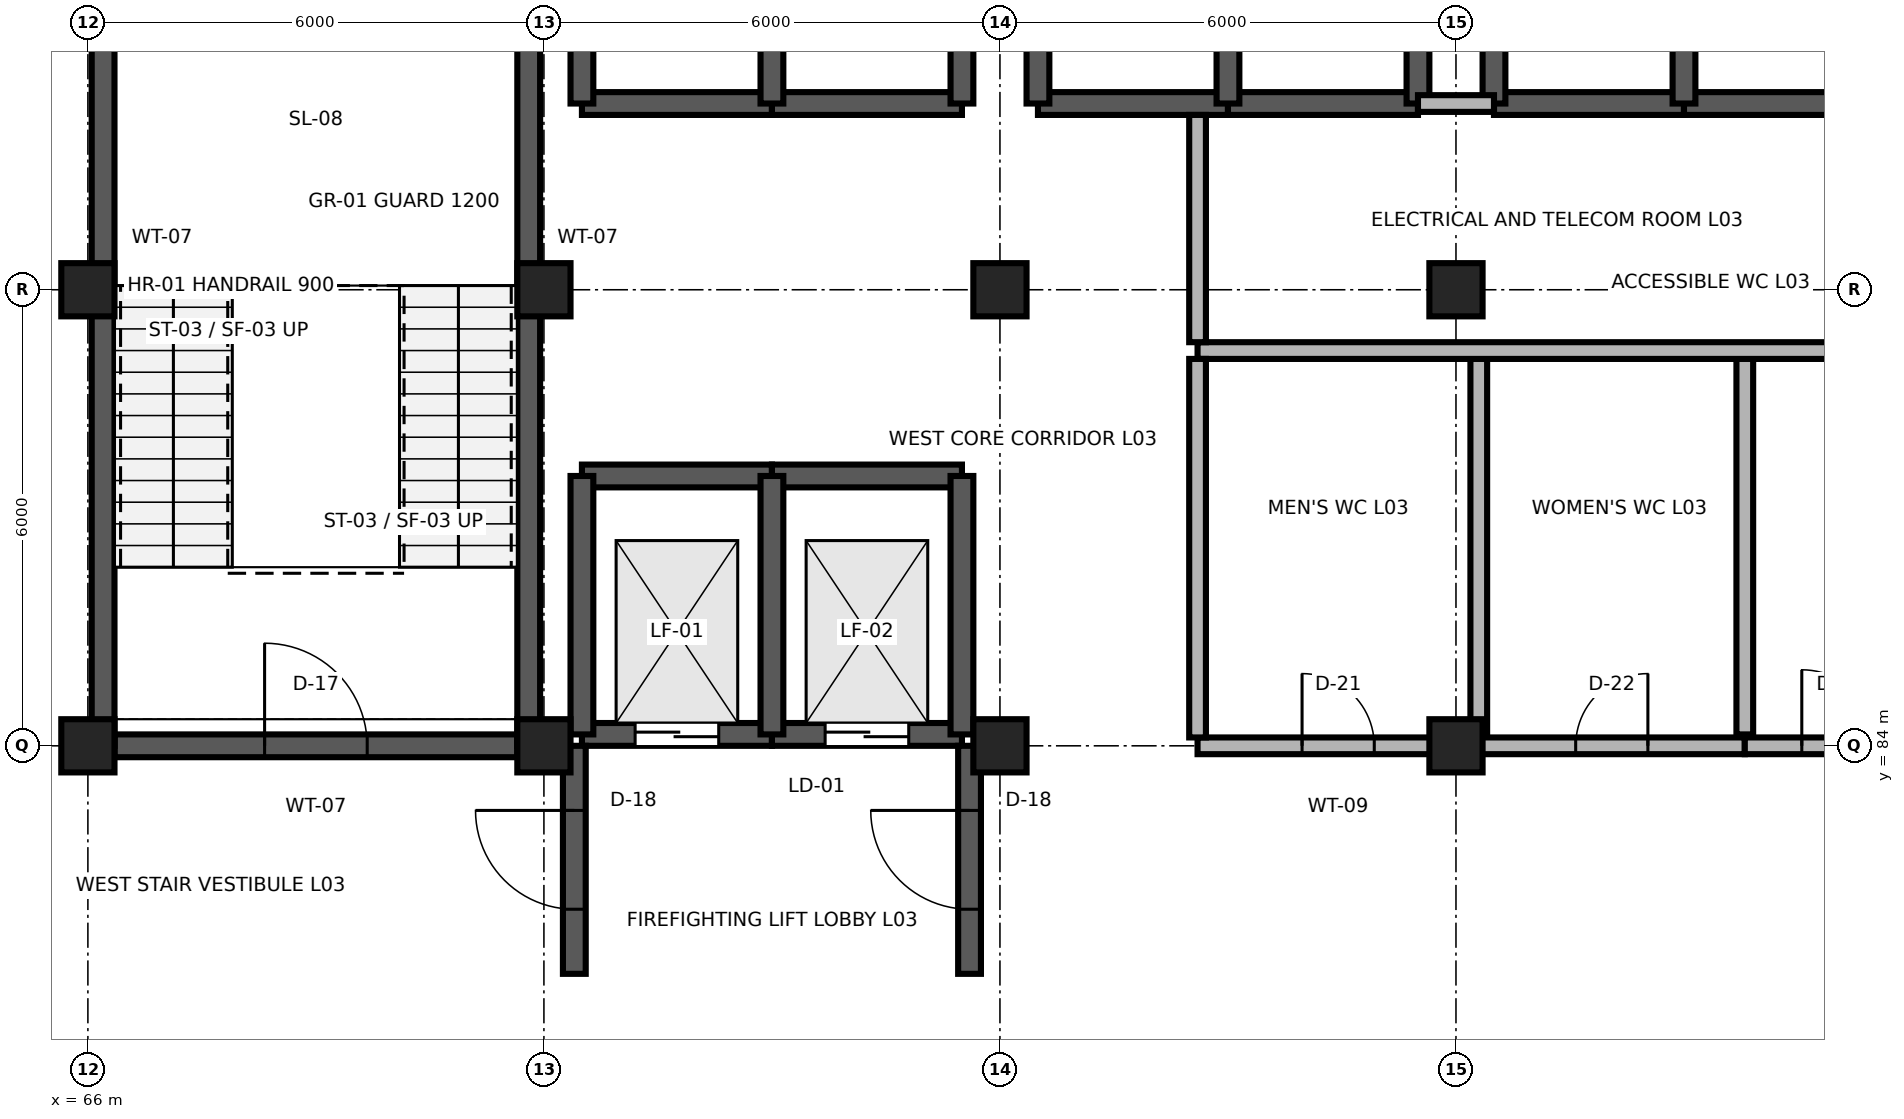
"""IFC4 building model, lengths in metres.
Left out: names, types, materials, properties, quantities, classifications, styles, units other than length and angle.
Written with IfcOpenShell. Run it as: python <this file> out.ifc"""

import sys

from ifc_helpers import new_model, si_unit, direction, frame, frame_2d, origin, origin_2d, place, context, subcontext, project, spatial, rectangle, extrude, element, fill, save


model = new_model("IFC4")
c1 = context("Model", 3, precision=1e-05, world=origin(), true_north=direction((0.0, 1.0)))
c2 = subcontext(c1, "Body", "Model", "MODEL_VIEW")
j1 = project(units=[si_unit("LENGTHUNIT", "METRE"), si_unit("PLANEANGLEUNIT", "RADIAN")], contexts=[c1])
p1 = place(None, origin())
s1 = spatial("IfcSite", under=j1, at=p1, CompositionType="ELEMENT")
p2 = place(p1, origin())
s2 = spatial("IfcBuilding", under=s1, at=p2, CompositionType="ELEMENT")
p3 = place(p2, frame((0.0, 0.0, 12.0)))
s3 = spatial("IfcBuildingStorey", under=s2, at=p3, CompositionType="ELEMENT", Elevation=12.0)
for number, where, z_axis, x_axis in (
    (1, (66.0, 84.0, 0.0), (0.0, 0.0, 1.0), (1.0, 0.0, 0.0)),
    (2, (72.0, 84.0, 0.0), (0.0, 0.0, 1.0), (1.0, 0.0, 0.0)),
    (3, (78.0, 84.0, 0.0), (0.0, 0.0, 1.0), (1.0, 0.0, 0.0)),
    (4, (84.0, 84.0, 0.0), (0.0, 0.0, 1.0), (1.0, 0.0, 0.0)),
    (5, (66.0, 90.0, 0.0), (0.0, 0.0, 1.0), (1.0, 0.0, 0.0)),
    (6, (72.0, 90.0, 0.0), (0.0, 0.0, 1.0), (1.0, 0.0, 0.0)),
    (7, (78.0, 90.0, 0.0), (0.0, 0.0, 1.0), (1.0, 0.0, 0.0)),
    (8, (84.0, 90.0, 0.0), (0.0, 0.0, 1.0), (1.0, 0.0, 0.0)),
):
    element("IfcColumn", number, at=place(p3, frame(where, z_axis=z_axis, x_axis=x_axis)), inside=s3, PredefinedType="COLUMN", context=c2, shape_type="SweptSolid", body=[
        extrude(rectangle(XDim=0.7, YDim=0.7, at=origin_2d()), origin(), (0.0, 0.0, 1.0), 4.5),
    ])
p4 = place(p3, frame((66.35, 84.0, 0.0), z_axis=(0.0, 0.0, 1.0), x_axis=(1.0, 0.0, 0.0)))
e9 = element("IfcWall", 9, at=p4, inside=s3, PredefinedType="SHEAR", context=c2, shape_type="SweptSolid", body=[
    extrude(rectangle(XDim=5.3, YDim=0.3, at=frame_2d((2.65, 0.0))), origin(), (0.0, 0.0, 1.0), 4.22),
])
p5 = place(p4, frame((1.975, 0.0, 0.0)))
e10 = element("IfcOpeningElement", 10, at=p5, cuts=e9, PredefinedType="OPENING", context=c2, shape_type="SweptSolid", body=[
    extrude(rectangle(XDim=1.35, YDim=2.2, at=frame_2d((0.675, 1.1))), frame((0.0, 0.165, 0.0), z_axis=(0.0, -1.0, 0.0), x_axis=(1.0, 0.0, 0.0)), (0.0, 0.0, 1.0), 0.33),
])
for number, where, z_axis, x_axis in (
    (11, (66.2, 84.0, 0.0), (0.0, 0.0, 1.0), (0.0, 1.0, 0.0)),
    (12, (71.8, 84.0, 0.0), (0.0, 0.0, 1.0), (0.0, 1.0, 0.0)),
):
    element("IfcWall", number, at=place(p3, frame(where, z_axis=z_axis, x_axis=x_axis)), inside=s3, PredefinedType="SHEAR", context=c2, shape_type="SweptSolid", body=[
        extrude(rectangle(XDim=11.8, YDim=0.3, at=frame_2d((5.9, 0.0))), origin(), (0.0, 0.0, 1.0), 4.22),
    ])
p6 = place(p3, frame((72.5, 84.15, 0.0), z_axis=(0.0, 0.0, 1.0), x_axis=(1.0, 0.0, 0.0)))
e13 = element("IfcWall", 13, at=p6, inside=s3, PredefinedType="SHEAR", context=c2, shape_type="SweptSolid", body=[
    extrude(rectangle(XDim=2.5, YDim=0.3, at=frame_2d((1.25, 0.0))), origin(), (0.0, 0.0, 1.0), 4.22),
])
p7 = place(p6, frame((0.7, 0.0, 0.0)))
e14 = element("IfcOpeningElement", 14, at=p7, cuts=e13, PredefinedType="OPENING", context=c2, shape_type="SweptSolid", body=[
    extrude(rectangle(XDim=1.1, YDim=2.1, at=frame_2d((0.55, 1.05))), frame((0.0, 0.165, 0.0), z_axis=(0.0, -1.0, 0.0), x_axis=(1.0, 0.0, 0.0)), (0.0, 0.0, 1.0), 0.33),
])
p8 = place(p3, frame((72.5, 87.55, 0.0), z_axis=(0.0, 0.0, 1.0), x_axis=(1.0, 0.0, 0.0)))
e15 = element("IfcWall", 15, at=p8, inside=s3, PredefinedType="SHEAR", context=c2, shape_type="SweptSolid", body=[
    extrude(rectangle(XDim=2.5, YDim=0.3, at=frame_2d((1.25, 0.0))), origin(), (0.0, 0.0, 1.0), 4.22),
])
p9 = place(p3, frame((72.5, 84.15, 0.0), z_axis=(0.0, 0.0, 1.0), x_axis=(0.0, 1.0, 0.0)))
e16 = element("IfcWall", 16, at=p9, inside=s3, PredefinedType="SHEAR", context=c2, shape_type="SweptSolid", body=[
    extrude(rectangle(XDim=3.4, YDim=0.3, at=frame_2d((1.7, 0.0))), origin(), (0.0, 0.0, 1.0), 4.22),
])
p10 = place(p3, frame((75.0, 84.15, 0.0), z_axis=(0.0, 0.0, 1.0), x_axis=(1.0, 0.0, 0.0)))
e17 = element("IfcWall", 17, at=p10, inside=s3, PredefinedType="SHEAR", context=c2, shape_type="SweptSolid", body=[
    extrude(rectangle(XDim=2.5, YDim=0.3, at=frame_2d((1.25, 0.0))), origin(), (0.0, 0.0, 1.0), 4.22),
])
p11 = place(p10, frame((0.7, 0.0, 0.0)))
e18 = element("IfcOpeningElement", 18, at=p11, cuts=e17, PredefinedType="OPENING", context=c2, shape_type="SweptSolid", body=[
    extrude(rectangle(XDim=1.1, YDim=2.1, at=frame_2d((0.55, 1.05))), frame((0.0, 0.165, 0.0), z_axis=(0.0, -1.0, 0.0), x_axis=(1.0, 0.0, 0.0)), (0.0, 0.0, 1.0), 0.33),
])
p12 = place(p3, frame((75.0, 87.55, 0.0), z_axis=(0.0, 0.0, 1.0), x_axis=(1.0, 0.0, 0.0)))
e19 = element("IfcWall", 19, at=p12, inside=s3, PredefinedType="SHEAR", context=c2, shape_type="SweptSolid", body=[
    extrude(rectangle(XDim=2.5, YDim=0.3, at=frame_2d((1.25, 0.0))), origin(), (0.0, 0.0, 1.0), 4.22),
])
for number, where, z_axis, x_axis in (
    (20, (75.0, 84.15, 0.0), (0.0, 0.0, 1.0), (0.0, 1.0, 0.0)),
    (21, (77.5, 84.15, 0.0), (0.0, 0.0, 1.0), (0.0, 1.0, 0.0)),
):
    element("IfcWall", number, at=place(p3, frame(where, z_axis=z_axis, x_axis=x_axis)), inside=s3, PredefinedType="SHEAR", context=c2, shape_type="SweptSolid", body=[
        extrude(rectangle(XDim=3.4, YDim=0.3, at=frame_2d((1.7, 0.0))), origin(), (0.0, 0.0, 1.0), 4.22),
    ])
p13 = place(p3, frame((72.5, 92.45, 0.0), z_axis=(0.0, 0.0, 1.0), x_axis=(1.0, 0.0, 0.0)))
e22 = element("IfcWall", 22, at=p13, inside=s3, PredefinedType="SHEAR", context=c2, shape_type="SweptSolid", body=[
    extrude(rectangle(XDim=2.5, YDim=0.3, at=frame_2d((1.25, 0.0))), origin(), (0.0, 0.0, 1.0), 4.22),
])
p14 = place(p3, frame((72.5, 92.45, 0.0), z_axis=(0.0, 0.0, 1.0), x_axis=(0.0, 1.0, 0.0)))
e23 = element("IfcWall", 23, at=p14, inside=s3, PredefinedType="SHEAR", context=c2, shape_type="SweptSolid", body=[
    extrude(rectangle(XDim=3.4, YDim=0.3, at=frame_2d((1.7, 0.0))), origin(), (0.0, 0.0, 1.0), 4.22),
])
p15 = place(p3, frame((75.0, 92.45, 0.0), z_axis=(0.0, 0.0, 1.0), x_axis=(1.0, 0.0, 0.0)))
e24 = element("IfcWall", 24, at=p15, inside=s3, PredefinedType="SHEAR", context=c2, shape_type="SweptSolid", body=[
    extrude(rectangle(XDim=2.5, YDim=0.3, at=frame_2d((1.25, 0.0))), origin(), (0.0, 0.0, 1.0), 4.22),
])
for number, where, z_axis, x_axis in (
    (25, (75.0, 92.45, 0.0), (0.0, 0.0, 1.0), (0.0, 1.0, 0.0)),
    (26, (77.5, 92.45, 0.0), (0.0, 0.0, 1.0), (0.0, 1.0, 0.0)),
):
    element("IfcWall", number, at=place(p3, frame(where, z_axis=z_axis, x_axis=x_axis)), inside=s3, PredefinedType="SHEAR", context=c2, shape_type="SweptSolid", body=[
        extrude(rectangle(XDim=3.4, YDim=0.3, at=frame_2d((1.7, 0.0))), origin(), (0.0, 0.0, 1.0), 4.22),
    ])
p16 = place(p3, frame((78.5, 92.45, 0.0), z_axis=(0.0, 0.0, 1.0), x_axis=(1.0, 0.0, 0.0)))
e27 = element("IfcWall", 27, at=p16, inside=s3, PredefinedType="SHEAR", context=c2, shape_type="SweptSolid", body=[
    extrude(rectangle(XDim=2.5, YDim=0.3, at=frame_2d((1.25, 0.0))), origin(), (0.0, 0.0, 1.0), 4.22),
])
p17 = place(p3, frame((78.5, 92.45, 0.0), z_axis=(0.0, 0.0, 1.0), x_axis=(0.0, 1.0, 0.0)))
e28 = element("IfcWall", 28, at=p17, inside=s3, PredefinedType="SHEAR", context=c2, shape_type="SweptSolid", body=[
    extrude(rectangle(XDim=3.4, YDim=0.3, at=frame_2d((1.7, 0.0))), origin(), (0.0, 0.0, 1.0), 4.22),
])
p18 = place(p3, frame((81.0, 92.45, 0.0), z_axis=(0.0, 0.0, 1.0), x_axis=(1.0, 0.0, 0.0)))
e29 = element("IfcWall", 29, at=p18, inside=s3, PredefinedType="SHEAR", context=c2, shape_type="SweptSolid", body=[
    extrude(rectangle(XDim=2.5, YDim=0.3, at=frame_2d((1.25, 0.0))), origin(), (0.0, 0.0, 1.0), 4.22),
])
for number, where, z_axis, x_axis in (
    (30, (81.0, 92.45, 0.0), (0.0, 0.0, 1.0), (0.0, 1.0, 0.0)),
    (31, (83.5, 92.45, 0.0), (0.0, 0.0, 1.0), (0.0, 1.0, 0.0)),
):
    element("IfcWall", number, at=place(p3, frame(where, z_axis=z_axis, x_axis=x_axis)), inside=s3, PredefinedType="SHEAR", context=c2, shape_type="SweptSolid", body=[
        extrude(rectangle(XDim=3.4, YDim=0.3, at=frame_2d((1.7, 0.0))), origin(), (0.0, 0.0, 1.0), 4.22),
    ])
p19 = place(p3, frame((84.5, 92.45, 0.0), z_axis=(0.0, 0.0, 1.0), x_axis=(1.0, 0.0, 0.0)))
e32 = element("IfcWall", 32, at=p19, inside=s3, PredefinedType="SHEAR", context=c2, shape_type="SweptSolid", body=[
    extrude(rectangle(XDim=2.5, YDim=0.3, at=frame_2d((1.25, 0.0))), origin(), (0.0, 0.0, 1.0), 4.22),
])
p20 = place(p3, frame((84.5, 92.45, 0.0), z_axis=(0.0, 0.0, 1.0), x_axis=(0.0, 1.0, 0.0)))
e33 = element("IfcWall", 33, at=p20, inside=s3, PredefinedType="SHEAR", context=c2, shape_type="SweptSolid", body=[
    extrude(rectangle(XDim=3.4, YDim=0.3, at=frame_2d((1.7, 0.0))), origin(), (0.0, 0.0, 1.0), 4.22),
])
p21 = place(p3, frame((87.0, 92.45, 0.0), z_axis=(0.0, 0.0, 1.0), x_axis=(1.0, 0.0, 0.0)))
e34 = element("IfcWall", 34, at=p21, inside=s3, PredefinedType="SHEAR", context=c2, shape_type="SweptSolid", body=[
    extrude(rectangle(XDim=2.5, YDim=0.3, at=frame_2d((1.25, 0.0))), origin(), (0.0, 0.0, 1.0), 4.22),
])
p22 = place(p3, frame((87.0, 92.45, 0.0), z_axis=(0.0, 0.0, 1.0), x_axis=(0.0, 1.0, 0.0)))
e35 = element("IfcWall", 35, at=p22, inside=s3, PredefinedType="SHEAR", context=c2, shape_type="SweptSolid", body=[
    extrude(rectangle(XDim=3.4, YDim=0.3, at=frame_2d((1.7, 0.0))), origin(), (0.0, 0.0, 1.0), 4.22),
])
p23 = place(p3, frame((72.4, 81.0, 0.0), z_axis=(0.0, 0.0, 1.0), x_axis=(0.0, 1.0, 0.0)))
e36 = element("IfcWall", 36, at=p23, inside=s3, PredefinedType="SHEAR", context=c2, shape_type="SweptSolid", body=[
    extrude(rectangle(XDim=3.0, YDim=0.3, at=frame_2d((1.5, 0.0))), origin(), (0.0, 0.0, 1.0), 4.22),
])
p24 = place(p23, frame((0.85, 0.0, 0.0)))
e37 = element("IfcOpeningElement", 37, at=p24, cuts=e36, PredefinedType="OPENING", context=c2, shape_type="SweptSolid", body=[
    extrude(rectangle(XDim=1.3, YDim=2.2, at=frame_2d((0.65, 1.1))), frame((0.0, 0.165, 0.0), z_axis=(0.0, -1.0, 0.0), x_axis=(1.0, 0.0, 0.0)), (0.0, 0.0, 1.0), 0.33),
])
p25 = place(p3, frame((77.6, 81.0, 0.0), z_axis=(0.0, 0.0, 1.0), x_axis=(0.0, 1.0, 0.0)))
e38 = element("IfcWall", 38, at=p25, inside=s3, PredefinedType="SHEAR", context=c2, shape_type="SweptSolid", body=[
    extrude(rectangle(XDim=3.0, YDim=0.3, at=frame_2d((1.5, 0.0))), origin(), (0.0, 0.0, 1.0), 4.22),
])
p26 = place(p25, frame((0.85, 0.0, 0.0)))
e39 = element("IfcOpeningElement", 39, at=p26, cuts=e38, PredefinedType="OPENING", context=c2, shape_type="SweptSolid", body=[
    extrude(rectangle(XDim=1.3, YDim=2.2, at=frame_2d((0.65, 1.1))), frame((0.0, 0.165, 0.0), z_axis=(0.0, -1.0, 0.0), x_axis=(1.0, 0.0, 0.0)), (0.0, 0.0, 1.0), 0.33),
])
p27 = place(p3, frame((80.6, 84.0, 0.0), z_axis=(0.0, 0.0, 1.0), x_axis=(1.0, 0.0, 0.0)))
e40 = element("IfcWall", 40, at=p27, inside=s3, PredefinedType="PARTITIONING", context=c2, shape_type="SweptSolid", body=[
    extrude(rectangle(XDim=3.7, YDim=0.22, at=frame_2d((1.85, 0.0))), origin(), (0.0, 0.0, 1.0), 3.738),
])
p28 = place(p27, frame((1.375, 0.0, 0.0)))
e41 = element("IfcOpeningElement", 41, at=p28, cuts=e40, PredefinedType="OPENING", context=c2, shape_type="SweptSolid", body=[
    extrude(rectangle(XDim=0.95, YDim=2.15, at=frame_2d((0.475, 1.075))), frame((0.0, 0.125, 0.0), z_axis=(0.0, -1.0, 0.0), x_axis=(1.0, 0.0, 0.0)), (0.0, 0.0, 1.0), 0.25),
])
p29 = place(p3, frame((84.3, 84.0, 0.0), z_axis=(0.0, 0.0, 1.0), x_axis=(1.0, 0.0, 0.0)))
e42 = element("IfcWall", 42, at=p29, inside=s3, PredefinedType="PARTITIONING", context=c2, shape_type="SweptSolid", body=[
    extrude(rectangle(XDim=3.5, YDim=0.22, at=frame_2d((1.75, 0.0))), origin(), (0.0, 0.0, 1.0), 3.738),
])
p30 = place(p29, frame((1.275, 0.0, 0.0)))
e43 = element("IfcOpeningElement", 43, at=p30, cuts=e42, PredefinedType="OPENING", context=c2, shape_type="SweptSolid", body=[
    extrude(rectangle(XDim=0.95, YDim=2.1, at=frame_2d((0.475, 1.05))), frame((0.0, 0.125, 0.0), z_axis=(0.0, -1.0, 0.0), x_axis=(1.0, 0.0, 0.0)), (0.0, 0.0, 1.0), 0.25),
])
p31 = place(p3, frame((87.8, 84.0, 0.0), z_axis=(0.0, 0.0, 1.0), x_axis=(1.0, 0.0, 0.0)))
e44 = element("IfcWall", 44, at=p31, inside=s3, PredefinedType="PARTITIONING", context=c2, shape_type="SweptSolid", body=[
    extrude(rectangle(XDim=2.5, YDim=0.22, at=frame_2d((1.25, 0.0))), origin(), (0.0, 0.0, 1.0), 3.738),
])
p32 = place(p31, frame((0.75, 0.0, 0.0)))
e45 = element("IfcOpeningElement", 45, at=p32, cuts=e44, PredefinedType="OPENING", context=c2, shape_type="SweptSolid", body=[
    extrude(rectangle(XDim=1.0, YDim=2.15, at=frame_2d((0.5, 1.075))), frame((0.0, 0.125, 0.0), z_axis=(0.0, -1.0, 0.0), x_axis=(1.0, 0.0, 0.0)), (0.0, 0.0, 1.0), 0.25),
])
for number, where, z_axis, x_axis in (
    (46, (84.3, 84.15, 0.0), (0.0, 0.0, 1.0), (0.0, 1.0, 0.0)),
    (47, (87.8, 84.15, 0.0), (0.0, 0.0, 1.0), (0.0, 1.0, 0.0)),
):
    element("IfcWall", number, at=place(p3, frame(where, z_axis=z_axis, x_axis=x_axis)), inside=s3, PredefinedType="PARTITIONING", context=c2, shape_type="SweptSolid", body=[
        extrude(rectangle(XDim=5.0, YDim=0.22, at=frame_2d((2.5, 0.0))), origin(), (0.0, 0.0, 1.0), 4.22),
    ])
p33 = place(p3, frame((80.6, 89.2, 0.0), z_axis=(0.0, 0.0, 1.0), x_axis=(1.0, 0.0, 0.0)))
e48 = element("IfcWall", 48, at=p33, inside=s3, PredefinedType="PARTITIONING", context=c2, shape_type="SweptSolid", body=[
    extrude(rectangle(XDim=9.87, YDim=0.22, at=frame_2d((4.935, 0.0))), origin(), (0.0, 0.0, 1.0), 4.22),
])
p34 = place(p3, frame((80.6, 84.11, 0.0), z_axis=(0.0, 0.0, 1.0), x_axis=(0.0, 1.0, 0.0)))
e49 = element("IfcWall", 49, at=p34, inside=s3, PredefinedType="PARTITIONING", context=c2, shape_type="SweptSolid", body=[
    extrude(rectangle(XDim=4.98, YDim=0.22, at=frame_2d((2.49, 0.0))), origin(), (0.0, 0.0, 1.0), 4.22),
])
p35 = place(p3, frame((80.6, 89.31, 0.0), z_axis=(0.0, 0.0, 1.0), x_axis=(0.0, 1.0, 0.0)))
e50 = element("IfcWall", 50, at=p35, inside=s3, PredefinedType="PARTITIONING", context=c2, shape_type="SweptSolid", body=[
    extrude(rectangle(XDim=2.99, YDim=0.22, at=frame_2d((1.495, 0.0))), origin(), (0.0, 0.0, 1.0), 4.22),
])
p36 = place(p3, frame((83.5, 92.45, 0.0), z_axis=(0.0, 0.0, 1.0), x_axis=(1.0, 0.0, 0.0)))
e51 = element("IfcWall", 51, at=p36, inside=s3, PredefinedType="PARTITIONING", context=c2, shape_type="SweptSolid", body=[
    extrude(rectangle(XDim=1.0, YDim=0.22, at=frame_2d((0.5, 0.0))), origin(), (0.0, 0.0, 1.0), 4.22),
])
p37 = place(p5, origin())
e52 = element("IfcDoor", 52, at=p37, inside=s3, OperationType="SINGLE_SWING_LEFT", PredefinedType="DOOR", context=c2, shape_type="SweptSolid", body=[
    extrude(rectangle(XDim=1.35, YDim=2.2, at=frame_2d((0.675, 1.1))), frame((0.0, 0.025, 0.0), z_axis=(0.0, -1.0, 0.0), x_axis=(1.0, 0.0, 0.0)), (0.0, 0.0, 1.0), 0.05),
])
fill(e10, e52)
p38 = place(p7, origin())
e53 = element("IfcDoor", 53, at=p38, inside=s3, OperationType="DOUBLE_DOOR_SLIDING", PredefinedType="DOOR", context=c2, shape_type="SweptSolid", body=[
    extrude(rectangle(XDim=1.1, YDim=2.1, at=frame_2d((0.55, 1.05))), frame((0.0, 0.025, 0.0), z_axis=(0.0, -1.0, 0.0), x_axis=(1.0, 0.0, 0.0)), (0.0, 0.0, 1.0), 0.05),
])
fill(e14, e53)
p39 = place(p11, origin())
e54 = element("IfcDoor", 54, at=p39, inside=s3, OperationType="DOUBLE_DOOR_SLIDING", PredefinedType="DOOR", context=c2, shape_type="SweptSolid", body=[
    extrude(rectangle(XDim=1.1, YDim=2.1, at=frame_2d((0.55, 1.05))), frame((0.0, 0.025, 0.0), z_axis=(0.0, -1.0, 0.0), x_axis=(1.0, 0.0, 0.0)), (0.0, 0.0, 1.0), 0.05),
])
fill(e18, e54)
p40 = place(p24, origin())
e55 = element("IfcDoor", 55, at=p40, inside=s3, OperationType="SINGLE_SWING_RIGHT", PredefinedType="DOOR", context=c2, shape_type="SweptSolid", body=[
    extrude(rectangle(XDim=1.3, YDim=2.2, at=frame_2d((0.65, 1.1))), frame((0.0, 0.025, 0.0), z_axis=(0.0, -1.0, 0.0), x_axis=(1.0, 0.0, 0.0)), (0.0, 0.0, 1.0), 0.05),
])
fill(e37, e55)
p41 = place(p26, origin())
e56 = element("IfcDoor", 56, at=p41, inside=s3, OperationType="SINGLE_SWING_RIGHT", PredefinedType="DOOR", context=c2, shape_type="SweptSolid", body=[
    extrude(rectangle(XDim=1.3, YDim=2.2, at=frame_2d((0.65, 1.1))), frame((0.0, 0.025, 0.0), z_axis=(0.0, -1.0, 0.0), x_axis=(1.0, 0.0, 0.0)), (0.0, 0.0, 1.0), 0.05),
])
fill(e39, e56)
p42 = place(p28, origin())
e57 = element("IfcDoor", 57, at=p42, inside=s3, OperationType="SINGLE_SWING_LEFT", PredefinedType="DOOR", context=c2, shape_type="SweptSolid", body=[
    extrude(rectangle(XDim=0.95, YDim=2.15, at=frame_2d((0.475, 1.075))), frame((0.0, 0.025, 0.0), z_axis=(0.0, -1.0, 0.0), x_axis=(1.0, 0.0, 0.0)), (0.0, 0.0, 1.0), 0.05),
])
fill(e41, e57)
p43 = place(p30, origin())
e58 = element("IfcDoor", 58, at=p43, inside=s3, OperationType="SINGLE_SWING_RIGHT", PredefinedType="DOOR", context=c2, shape_type="SweptSolid", body=[
    extrude(rectangle(XDim=0.95, YDim=2.1, at=frame_2d((0.475, 1.05))), frame((0.0, 0.025, 0.0), z_axis=(0.0, -1.0, 0.0), x_axis=(1.0, 0.0, 0.0)), (0.0, 0.0, 1.0), 0.05),
])
fill(e43, e58)
p44 = place(p32, origin())
e59 = element("IfcDoor", 59, at=p44, inside=s3, OperationType="SINGLE_SWING_LEFT", PredefinedType="DOOR", context=c2, shape_type="SweptSolid", body=[
    extrude(rectangle(XDim=1.0, YDim=2.15, at=frame_2d((0.5, 1.075))), frame((0.0, 0.025, 0.0), z_axis=(0.0, -1.0, 0.0), x_axis=(1.0, 0.0, 0.0)), (0.0, 0.0, 1.0), 0.05),
])
fill(e45, e59)
save(model, sys.argv[1])
